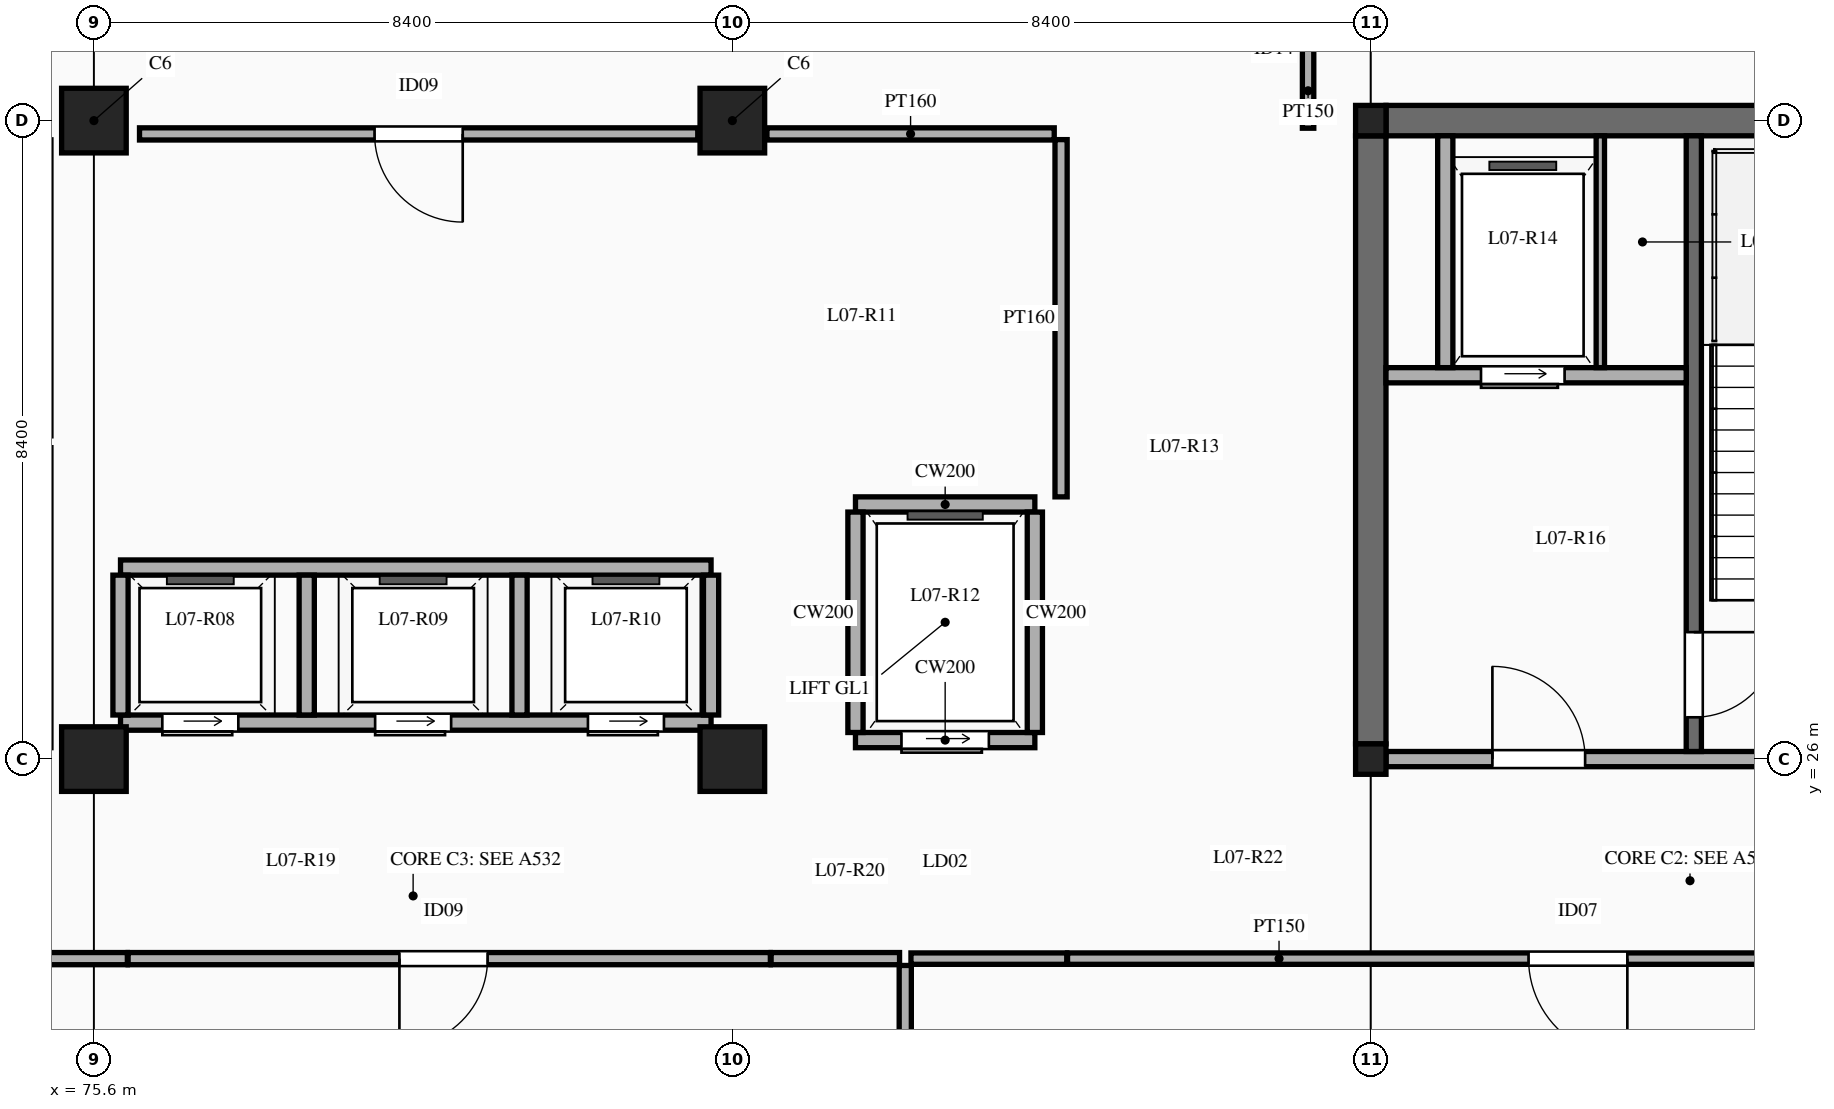
"""IFC4 building model, lengths in metres.
Left out: names, types, materials, properties, quantities, classifications, styles, units other than length and angle.
Written with IfcOpenShell. Run it as: python <this file> out.ifc"""

import sys

from ifc_helpers import new_model, si_unit, direction, frame, frame_2d, origin, origin_2d, place, context, subcontext, project, spatial, rectangle, extrude, element, fill, save


model = new_model("IFC4")
c1 = context("Model", 3, precision=1e-05, world=origin(), true_north=direction((0.0, 1.0)))
c2 = subcontext(c1, "Body", "Model", "MODEL_VIEW")
j1 = project(units=[si_unit("LENGTHUNIT", "METRE"), si_unit("PLANEANGLEUNIT", "RADIAN")], contexts=[c1])
p1 = place(None, origin())
s1 = spatial("IfcSite", under=j1, at=p1, CompositionType="ELEMENT")
p2 = place(p1, origin())
s2 = spatial("IfcBuilding", under=s1, at=p2, CompositionType="ELEMENT")
p3 = place(p2, frame((0.0, 0.0, 33.0)))
s3 = spatial("IfcBuildingStorey", under=s2, at=p3, CompositionType="ELEMENT", Elevation=33.0)
for number, where, z_axis, x_axis in (
    (1, (75.6, 26.0, 0.0), (0.0, 0.0, 1.0), (1.0, 0.0, 0.0)),
    (2, (75.6, 34.4, 0.0), (0.0, 0.0, 1.0), (1.0, 0.0, 0.0)),
    (3, (84.0, 26.0, 0.0), (0.0, 0.0, 1.0), (1.0, 0.0, 0.0)),
    (4, (84.0, 34.4, 0.0), (0.0, 0.0, 1.0), (1.0, 0.0, 0.0)),
):
    element("IfcColumn", number, at=place(p3, frame(where, z_axis=z_axis, x_axis=x_axis)), inside=s3, PredefinedType="COLUMN", context=c2, shape_type="SweptSolid", body=[
        extrude(rectangle(XDim=0.85, YDim=0.85, at=origin_2d()), origin(), (0.0, 0.0, 1.0), 4.5),
    ])
for number, where, z_axis, x_axis in (
    (5, (92.4, 26.0, 0.0), (0.0, 0.0, 1.0), (1.0, 0.0, 0.0)),
    (6, (92.4, 34.4, 0.0), (0.0, 0.0, 1.0), (1.0, 0.0, 0.0)),
):
    element("IfcColumn", number, at=place(p3, frame(where, z_axis=z_axis, x_axis=x_axis)), inside=s3, PredefinedType="COLUMN", context=c2, shape_type="SweptSolid", body=[
        extrude(rectangle(XDim=0.4, YDim=0.4, at=origin_2d()), origin(), (0.0, 0.0, 1.0), 4.5),
    ])
for number, where, z_axis, x_axis in (
    (7, (92.4, 26.2, 0.0), (0.0, 0.0, 1.0), (0.0, 1.0, 0.0)),
    (8, (92.6, 34.4, 0.0), (0.0, 0.0, 1.0), (1.0, 0.0, 0.0)),
):
    element("IfcWall", number, at=place(p3, frame(where, z_axis=z_axis, x_axis=x_axis)), inside=s3, PredefinedType="SHEAR", context=c2, shape_type="SweptSolid", body=[
        extrude(rectangle(XDim=8.0, YDim=0.4, at=frame_2d((4.0, 0.0))), origin(), (0.0, 0.0, 1.0), 4.5),
    ])
p4 = place(p3, frame((92.6, 26.0, 0.0), z_axis=(0.0, 0.0, 1.0), x_axis=(1.0, 0.0, 0.0)))
e9 = element("IfcWall", 9, at=p4, inside=s3, PredefinedType="SOLIDWALL", context=c2, shape_type="SweptSolid", body=[
    extrude(rectangle(XDim=8.0, YDim=0.2, at=frame_2d((4.0, 0.0))), origin(), (0.0, 0.0, 1.0), 3.73),
])
p5 = place(p4, frame((1.4, 0.0, 0.0)))
e10 = element("IfcOpeningElement", 10, at=p5, cuts=e9, PredefinedType="OPENING", context=c2, shape_type="SweptSolid", body=[
    extrude(rectangle(XDim=1.22, YDim=2.15, at=frame_2d((0.61, 1.075))), frame((0.0, 0.11, 0.0), z_axis=(0.0, -1.0, 0.0), x_axis=(1.0, 0.0, 0.0)), (0.0, 0.0, 1.0), 0.22),
])
p6 = place(p4, frame((5.3, 0.0, 0.0)))
e11 = element("IfcOpeningElement", 11, at=p6, cuts=e9, PredefinedType="OPENING", context=c2, shape_type="SweptSolid", body=[
    extrude(rectangle(XDim=1.15, YDim=2.15, at=frame_2d((0.575, 1.075))), frame((0.0, 0.11, 0.0), z_axis=(0.0, -1.0, 0.0), x_axis=(1.0, 0.0, 0.0)), (0.0, 0.0, 1.0), 0.22),
])
p7 = place(p3, frame((96.65, 26.1, 0.0), z_axis=(0.0, 0.0, 1.0), x_axis=(0.0, 1.0, 0.0)))
e12 = element("IfcWall", 12, at=p7, inside=s3, PredefinedType="SOLIDWALL", context=c2, shape_type="SweptSolid", body=[
    extrude(rectangle(XDim=8.1, YDim=0.2, at=frame_2d((4.05, 0.0))), origin(), (0.0, 0.0, 1.0), 4.3),
])
p8 = place(p7, frame((0.45, 0.0, 0.0)))
e13 = element("IfcOpeningElement", 13, at=p8, cuts=e12, PredefinedType="OPENING", context=c2, shape_type="SweptSolid", body=[
    extrude(rectangle(XDim=1.12, YDim=2.15, at=frame_2d((0.56, 1.075))), frame((0.0, 0.11, 0.0), z_axis=(0.0, -1.0, 0.0), x_axis=(1.0, 0.0, 0.0)), (0.0, 0.0, 1.0), 0.22),
])
p9 = place(p3, frame((92.6, 31.05, 0.0), z_axis=(0.0, 0.0, 1.0), x_axis=(1.0, 0.0, 0.0)))
e14 = element("IfcWall", 14, at=p9, inside=s3, PredefinedType="SOLIDWALL", context=c2, shape_type="SweptSolid", body=[
    extrude(rectangle(XDim=3.95, YDim=0.2, at=frame_2d((1.975, 0.0))), origin(), (0.0, 0.0, 1.0), 4.3),
])
p10 = place(p9, frame((1.25, 0.0, 0.0)))
e15 = element("IfcOpeningElement", 15, at=p10, cuts=e14, PredefinedType="OPENING", context=c2, shape_type="SweptSolid", body=[
    extrude(rectangle(XDim=1.1, YDim=2.15, at=frame_2d((0.55, 1.075))), frame((0.0, 0.11, 0.0), z_axis=(0.0, -1.0, 0.0), x_axis=(1.0, 0.0, 0.0)), (0.0, 0.0, 1.0), 0.22),
])
p11 = place(p3, frame((95.42, 31.15, 0.0), z_axis=(0.0, 0.0, 1.0), x_axis=(0.0, 1.0, 0.0)))
e16 = element("IfcWall", 16, at=p11, inside=s3, PredefinedType="PARTITIONING", context=c2, shape_type="SweptSolid", body=[
    extrude(rectangle(XDim=3.05, YDim=0.11, at=frame_2d((1.525, 0.0))), origin(), (0.0, 0.0, 1.0), 4.3),
])
p12 = place(p3, frame((93.38, 31.15, 0.0), z_axis=(0.0, 0.0, 1.0), x_axis=(0.0, 1.0, 0.0)))
e17 = element("IfcWall", 17, at=p12, inside=s3, PredefinedType="SOLIDWALL", context=c2, shape_type="SweptSolid", body=[
    extrude(rectangle(XDim=3.05, YDim=0.2, at=frame_2d((1.525, 0.0))), origin(), (0.0, 0.0, 1.0), 4.3),
])
p13 = place(p3, frame((75.95, 26.48, 0.0), z_axis=(0.0, 0.0, 1.0), x_axis=(1.0, 0.0, 0.0)))
e18 = element("IfcWall", 18, at=p13, inside=s3, PredefinedType="SOLIDWALL", context=c2, shape_type="SweptSolid", body=[
    extrude(rectangle(XDim=7.77, YDim=0.2, at=frame_2d((3.885, 0.0))), origin(), (0.0, 0.0, 1.0), 4.3),
])
p14 = place(p13, frame((0.55, 0.0, 0.0)))
e19 = element("IfcOpeningElement", 19, at=p14, cuts=e18, PredefinedType="OPENING", context=c2, shape_type="SweptSolid", body=[
    extrude(rectangle(XDim=1.0, YDim=2.15, at=frame_2d((0.5, 1.075))), frame((0.0, 0.11, 0.0), z_axis=(0.0, -1.0, 0.0), x_axis=(1.0, 0.0, 0.0)), (0.0, 0.0, 1.0), 0.22),
])
p15 = place(p13, frame((3.35, 0.0, 0.0)))
e20 = element("IfcOpeningElement", 20, at=p15, cuts=e18, PredefinedType="OPENING", context=c2, shape_type="SweptSolid", body=[
    extrude(rectangle(XDim=1.0, YDim=2.15, at=frame_2d((0.5, 1.075))), frame((0.0, 0.11, 0.0), z_axis=(0.0, -1.0, 0.0), x_axis=(1.0, 0.0, 0.0)), (0.0, 0.0, 1.0), 0.22),
])
p16 = place(p13, frame((6.15, 0.0, 0.0)))
e21 = element("IfcOpeningElement", 21, at=p16, cuts=e18, PredefinedType="OPENING", context=c2, shape_type="SweptSolid", body=[
    extrude(rectangle(XDim=1.0, YDim=2.15, at=frame_2d((0.5, 1.075))), frame((0.0, 0.11, 0.0), z_axis=(0.0, -1.0, 0.0), x_axis=(1.0, 0.0, 0.0)), (0.0, 0.0, 1.0), 0.22),
])
p17 = place(p3, frame((75.95, 28.52, 0.0), z_axis=(0.0, 0.0, 1.0), x_axis=(1.0, 0.0, 0.0)))
e22 = element("IfcWall", 22, at=p17, inside=s3, PredefinedType="SOLIDWALL", context=c2, shape_type="SweptSolid", body=[
    extrude(rectangle(XDim=7.77, YDim=0.2, at=frame_2d((3.885, 0.0))), origin(), (0.0, 0.0, 1.0), 4.3),
])
for number, where, z_axis, x_axis in (
    (23, (75.95, 26.58, 0.0), (0.0, 0.0, 1.0), (0.0, 1.0, 0.0)),
    (24, (78.4, 26.58, 0.0), (0.0, 0.0, 1.0), (0.0, 1.0, 0.0)),
    (25, (81.2, 26.58, 0.0), (0.0, 0.0, 1.0), (0.0, 1.0, 0.0)),
):
    element("IfcWall", number, at=place(p3, frame(where, z_axis=z_axis, x_axis=x_axis)), inside=s3, PredefinedType="SOLIDWALL", context=c2, shape_type="SweptSolid", body=[
        extrude(rectangle(XDim=1.84, YDim=0.2, at=frame_2d((0.92, 0.0))), origin(), (0.0, 0.0, 1.0), 4.3),
    ])
p18 = place(p3, frame((83.72, 26.58, 0.0), z_axis=(0.0, 0.0, 1.0), x_axis=(0.0, 1.0, 0.0)))
e26 = element("IfcWall", 26, at=p18, inside=s3, PredefinedType="SOLIDWALL", context=c2, shape_type="SweptSolid", body=[
    extrude(rectangle(XDim=1.84, YDim=0.2, at=frame_2d((0.92, 0.0))), origin(), (0.0, 0.0, 1.0), 3.78),
])
p19 = place(p3, frame((85.62, 26.25, 0.0), z_axis=(0.0, 0.0, 1.0), x_axis=(1.0, 0.0, 0.0)))
e27 = element("IfcWall", 27, at=p19, inside=s3, PredefinedType="SOLIDWALL", context=c2, shape_type="SweptSolid", body=[
    extrude(rectangle(XDim=2.36, YDim=0.2, at=frame_2d((1.18, 0.0))), origin(), (0.0, 0.0, 1.0), 3.73),
])
p20 = place(p19, frame((0.605, 0.0, 0.0)))
e28 = element("IfcOpeningElement", 28, at=p20, cuts=e27, PredefinedType="OPENING", context=c2, shape_type="SweptSolid", body=[
    extrude(rectangle(XDim=1.15, YDim=2.2, at=frame_2d((0.575, 1.1))), frame((0.0, 0.11, 0.0), z_axis=(0.0, -1.0, 0.0), x_axis=(1.0, 0.0, 0.0)), (0.0, 0.0, 1.0), 0.22),
])
p21 = place(p3, frame((85.62, 29.35, 0.0), z_axis=(0.0, 0.0, 1.0), x_axis=(1.0, 0.0, 0.0)))
e29 = element("IfcWall", 29, at=p21, inside=s3, PredefinedType="SOLIDWALL", context=c2, shape_type="SweptSolid", body=[
    extrude(rectangle(XDim=2.36, YDim=0.2, at=frame_2d((1.18, 0.0))), origin(), (0.0, 0.0, 1.0), 4.3),
])
p22 = place(p3, frame((85.62, 26.35, 0.0), z_axis=(0.0, 0.0, 1.0), x_axis=(0.0, 1.0, 0.0)))
e30 = element("IfcWall", 30, at=p22, inside=s3, PredefinedType="SOLIDWALL", context=c2, shape_type="SweptSolid", body=[
    extrude(rectangle(XDim=2.9, YDim=0.2, at=frame_2d((1.45, 0.0))), origin(), (0.0, 0.0, 1.0), 4.3),
])
p23 = place(p3, frame((87.98, 26.35, 0.0), z_axis=(0.0, 0.0, 1.0), x_axis=(0.0, 1.0, 0.0)))
e31 = element("IfcWall", 31, at=p23, inside=s3, PredefinedType="SOLIDWALL", context=c2, shape_type="SweptSolid", body=[
    extrude(rectangle(XDim=2.9, YDim=0.2, at=frame_2d((1.45, 0.0))), origin(), (0.0, 0.0, 1.0), 3.98),
])
p24 = place(p3, frame((88.325, 29.45, 0.0), z_axis=(0.0, 0.0, 1.0), x_axis=(0.0, 1.0, 0.0)))
e32 = element("IfcWall", 32, at=p24, inside=s3, PredefinedType="PARTITIONING", context=c2, shape_type="SweptSolid", body=[
    extrude(rectangle(XDim=4.7, YDim=0.16, at=frame_2d((2.35, 0.0))), origin(), (0.0, 0.0, 1.0), 3.45),
])
p25 = place(p3, frame((76.2, 34.225, 0.0), z_axis=(0.0, 0.0, 1.0), x_axis=(1.0, 0.0, 0.0)))
e33 = element("IfcWall", 33, at=p25, inside=s3, PredefinedType="PARTITIONING", context=c2, shape_type="SweptSolid", body=[
    extrude(rectangle(XDim=7.345, YDim=0.16, at=frame_2d((3.672, 0.0))), origin(), (0.0, 0.0, 1.0), 3.45),
])
p26 = place(p25, frame((3.093, 0.0, 0.0)))
e34 = element("IfcOpeningElement", 34, at=p26, cuts=e33, PredefinedType="OPENING", context=c2, shape_type="SweptSolid", body=[
    extrude(rectangle(XDim=1.16, YDim=2.2, at=frame_2d((0.58, 1.1))), frame((0.0, 0.09, 0.0), z_axis=(0.0, -1.0, 0.0), x_axis=(1.0, 0.0, 0.0)), (0.0, 0.0, 1.0), 0.18),
])
p27 = place(p3, frame((84.455, 34.225, 0.0), z_axis=(0.0, 0.0, 1.0), x_axis=(1.0, 0.0, 0.0)))
e35 = element("IfcWall", 35, at=p27, inside=s3, PredefinedType="PARTITIONING", context=c2, shape_type="SweptSolid", body=[
    extrude(rectangle(XDim=3.78, YDim=0.16, at=frame_2d((1.89, 0.0))), origin(), (0.0, 0.0, 1.0), 3.45),
])
p28 = place(p3, frame((76.05, 23.375, 0.0), z_axis=(0.0, 0.0, 1.0), x_axis=(1.0, 0.0, 0.0)))
e36 = element("IfcWall", 36, at=p28, inside=s3, PredefinedType="PARTITIONING", context=c2, shape_type="SweptSolid", body=[
    extrude(rectangle(XDim=8.45, YDim=0.16, at=frame_2d((4.225, 0.0))), origin(), (0.0, 0.0, 1.0), 3.45),
])
p29 = place(p28, frame((3.57, 0.0, 0.0)))
e37 = element("IfcOpeningElement", 37, at=p29, cuts=e36, PredefinedType="OPENING", context=c2, shape_type="SweptSolid", body=[
    extrude(rectangle(XDim=1.16, YDim=2.2, at=frame_2d((0.58, 1.1))), frame((0.0, 0.09, 0.0), z_axis=(0.0, -1.0, 0.0), x_axis=(1.0, 0.0, 0.0)), (0.0, 0.0, 1.0), 0.18),
])
p30 = place(p3, frame((84.51, 23.375, 0.0), z_axis=(0.0, 0.0, 1.0), x_axis=(1.0, 0.0, 0.0)))
e38 = element("IfcWall", 38, at=p30, inside=s3, PredefinedType="PARTITIONING", context=c2, shape_type="SweptSolid", body=[
    extrude(rectangle(XDim=1.69, YDim=0.16, at=frame_2d((0.845, 0.0))), origin(), (0.0, 0.0, 1.0), 3.45),
])
p31 = place(p3, frame((86.35, 23.375, 0.0), z_axis=(0.0, 0.0, 1.0), x_axis=(1.0, 0.0, 0.0)))
e39 = element("IfcWall", 39, at=p31, inside=s3, PredefinedType="PARTITIONING", context=c2, shape_type="SweptSolid", body=[
    extrude(rectangle(XDim=2.05, YDim=0.15, at=frame_2d((1.025, 0.0))), origin(), (0.0, 0.0, 1.0), 3.45),
])
p32 = place(p3, frame((69.95, 23.375, 0.0), z_axis=(0.0, 0.0, 1.0), x_axis=(1.0, 0.0, 0.0)))
e40 = element("IfcWall", 40, at=p32, inside=s3, PredefinedType="PARTITIONING", context=c2, shape_type="SweptSolid", body=[
    extrude(rectangle(XDim=6.09, YDim=0.16, at=frame_2d((3.045, 0.0))), origin(), (0.0, 0.0, 1.0), 3.45),
])
p33 = place(p3, frame((88.41, 23.375, 0.0), z_axis=(0.0, 0.0, 1.0), x_axis=(1.0, 0.0, 0.0)))
e41 = element("IfcWall", 41, at=p33, inside=s3, PredefinedType="PARTITIONING", context=c2, shape_type="SweptSolid", body=[
    extrude(rectangle(XDim=11.94, YDim=0.15, at=frame_2d((5.97, 0.0))), origin(), (0.0, 0.0, 1.0), 3.45),
])
p34 = place(p33, frame((6.066, 0.0, 0.0)))
e42 = element("IfcOpeningElement", 42, at=p34, cuts=e41, PredefinedType="OPENING", context=c2, shape_type="SweptSolid", body=[
    extrude(rectangle(XDim=1.3, YDim=2.25, at=frame_2d((0.65, 1.125))), frame((0.0, 0.085, 0.0), z_axis=(0.0, -1.0, 0.0), x_axis=(1.0, 0.0, 0.0)), (0.0, 0.0, 1.0), 0.17),
])
p35 = place(p3, frame((86.275, 9.65, 0.0), z_axis=(0.0, 0.0, 1.0), x_axis=(0.0, 1.0, 0.0)))
e43 = element("IfcWall", 43, at=p35, inside=s3, PredefinedType="PARTITIONING", context=c2, shape_type="SweptSolid", body=[
    extrude(rectangle(XDim=13.635, YDim=0.16, at=frame_2d((6.817, 0.0))), origin(), (0.0, 0.0, 1.0), 3.45),
])
p36 = place(p3, frame((91.575, 34.3, 0.0), z_axis=(0.0, 0.0, 1.0), x_axis=(0.0, 1.0, 0.0)))
e44 = element("IfcWall", 44, at=p36, inside=s3, PredefinedType="PARTITIONING", context=c2, shape_type="SweptSolid", body=[
    extrude(rectangle(XDim=2.735, YDim=0.15, at=frame_2d((1.367, 0.0))), origin(), (0.0, 0.0, 1.0), 3.45),
])
p37 = place(p36, frame((1.485, 0.0, 0.0)))
e45 = element("IfcOpeningElement", 45, at=p37, cuts=e44, PredefinedType="OPENING", context=c2, shape_type="SweptSolid", body=[
    extrude(rectangle(XDim=1.0, YDim=2.15, at=frame_2d((0.5, 1.075))), frame((0.0, 0.085, 0.0), z_axis=(0.0, -1.0, 0.0), x_axis=(1.0, 0.0, 0.0)), (0.0, 0.0, 1.0), 0.17),
])
p38 = place(p5, origin())
e46 = element("IfcDoor", 46, at=p38, inside=s3, OperationType="SINGLE_SWING_LEFT", PredefinedType="DOOR", context=c2, shape_type="SweptSolid", body=[
    extrude(rectangle(XDim=1.22, YDim=2.15, at=frame_2d((0.61, 1.075))), frame((0.0, 0.025, 0.0), z_axis=(0.0, -1.0, 0.0), x_axis=(1.0, 0.0, 0.0)), (0.0, 0.0, 1.0), 0.05),
])
fill(e10, e46)
p39 = place(p8, frame((1.12, 0.0, 0.0), z_axis=(0.0, 0.0, 1.0), x_axis=(-1.0, 0.0, 0.0)))
e47 = element("IfcDoor", 47, at=p39, inside=s3, OperationType="SINGLE_SWING_LEFT", PredefinedType="DOOR", context=c2, shape_type="SweptSolid", body=[
    extrude(rectangle(XDim=1.12, YDim=2.15, at=frame_2d((0.56, 1.075))), frame((0.0, 0.025, 0.0), z_axis=(0.0, -1.0, 0.0), x_axis=(1.0, 0.0, 0.0)), (0.0, 0.0, 1.0), 0.05),
])
fill(e13, e47)
p40 = place(p10, frame((1.1, 0.0, 0.0), z_axis=(0.0, 0.0, 1.0), x_axis=(-1.0, 0.0, 0.0)))
e48 = element("IfcDoor", 48, at=p40, inside=s3, OperationType="SLIDING_TO_LEFT", PredefinedType="DOOR", context=c2, shape_type="SweptSolid", body=[
    extrude(rectangle(XDim=1.1, YDim=2.15, at=frame_2d((0.55, 1.075))), frame((0.0, 0.025, 0.0), z_axis=(0.0, -1.0, 0.0), x_axis=(1.0, 0.0, 0.0)), (0.0, 0.0, 1.0), 0.05),
])
fill(e15, e48)
p41 = place(p14, frame((1.0, 0.0, 0.0), z_axis=(0.0, 0.0, 1.0), x_axis=(-1.0, 0.0, 0.0)))
e49 = element("IfcDoor", 49, at=p41, inside=s3, OperationType="SLIDING_TO_LEFT", PredefinedType="DOOR", context=c2, shape_type="SweptSolid", body=[
    extrude(rectangle(XDim=1.0, YDim=2.15, at=frame_2d((0.5, 1.075))), frame((0.0, 0.025, 0.0), z_axis=(0.0, -1.0, 0.0), x_axis=(1.0, 0.0, 0.0)), (0.0, 0.0, 1.0), 0.05),
])
fill(e19, e49)
p42 = place(p15, frame((1.0, 0.0, 0.0), z_axis=(0.0, 0.0, 1.0), x_axis=(-1.0, 0.0, 0.0)))
e50 = element("IfcDoor", 50, at=p42, inside=s3, OperationType="SLIDING_TO_LEFT", PredefinedType="DOOR", context=c2, shape_type="SweptSolid", body=[
    extrude(rectangle(XDim=1.0, YDim=2.15, at=frame_2d((0.5, 1.075))), frame((0.0, 0.025, 0.0), z_axis=(0.0, -1.0, 0.0), x_axis=(1.0, 0.0, 0.0)), (0.0, 0.0, 1.0), 0.05),
])
fill(e20, e50)
p43 = place(p16, frame((1.0, 0.0, 0.0), z_axis=(0.0, 0.0, 1.0), x_axis=(-1.0, 0.0, 0.0)))
e51 = element("IfcDoor", 51, at=p43, inside=s3, OperationType="SLIDING_TO_LEFT", PredefinedType="DOOR", context=c2, shape_type="SweptSolid", body=[
    extrude(rectangle(XDim=1.0, YDim=2.15, at=frame_2d((0.5, 1.075))), frame((0.0, 0.025, 0.0), z_axis=(0.0, -1.0, 0.0), x_axis=(1.0, 0.0, 0.0)), (0.0, 0.0, 1.0), 0.05),
])
fill(e21, e51)
p44 = place(p20, frame((1.15, 0.0, 0.0), z_axis=(0.0, 0.0, 1.0), x_axis=(-1.0, 0.0, 0.0)))
e52 = element("IfcDoor", 52, at=p44, inside=s3, OperationType="SLIDING_TO_LEFT", PredefinedType="DOOR", context=c2, shape_type="SweptSolid", body=[
    extrude(rectangle(XDim=1.15, YDim=2.2, at=frame_2d((0.575, 1.1))), frame((0.0, 0.025, 0.0), z_axis=(0.0, -1.0, 0.0), x_axis=(1.0, 0.0, 0.0)), (0.0, 0.0, 1.0), 0.05),
])
fill(e28, e52)
p45 = place(p26, frame((1.16, 0.0, 0.0), z_axis=(0.0, 0.0, 1.0), x_axis=(-1.0, 0.0, 0.0)))
e53 = element("IfcDoor", 53, at=p45, inside=s3, OperationType="SINGLE_SWING_LEFT", PredefinedType="DOOR", context=c2, shape_type="SweptSolid", body=[
    extrude(rectangle(XDim=1.16, YDim=2.2, at=frame_2d((0.58, 1.1))), frame((0.0, 0.025, 0.0), z_axis=(0.0, -1.0, 0.0), x_axis=(1.0, 0.0, 0.0)), (0.0, 0.0, 1.0), 0.05),
])
fill(e34, e53)
p46 = place(p29, frame((1.16, 0.0, 0.0), z_axis=(0.0, 0.0, 1.0), x_axis=(-1.0, 0.0, 0.0)))
e54 = element("IfcDoor", 54, at=p46, inside=s3, OperationType="SINGLE_SWING_RIGHT", PredefinedType="DOOR", context=c2, shape_type="SweptSolid", body=[
    extrude(rectangle(XDim=1.16, YDim=2.2, at=frame_2d((0.58, 1.1))), frame((0.0, 0.025, 0.0), z_axis=(0.0, -1.0, 0.0), x_axis=(1.0, 0.0, 0.0)), (0.0, 0.0, 1.0), 0.05),
])
fill(e37, e54)
p47 = place(p34, frame((1.3, 0.0, 0.0), z_axis=(0.0, 0.0, 1.0), x_axis=(-1.0, 0.0, 0.0)))
e55 = element("IfcDoor", 55, at=p47, inside=s3, OperationType="SINGLE_SWING_LEFT", PredefinedType="DOOR", context=c2, shape_type="SweptSolid", body=[
    extrude(rectangle(XDim=1.3, YDim=2.25, at=frame_2d((0.65, 1.125))), frame((0.0, 0.025, 0.0), z_axis=(0.0, -1.0, 0.0), x_axis=(1.0, 0.0, 0.0)), (0.0, 0.0, 1.0), 0.05),
])
fill(e42, e55)
save(model, sys.argv[1])
